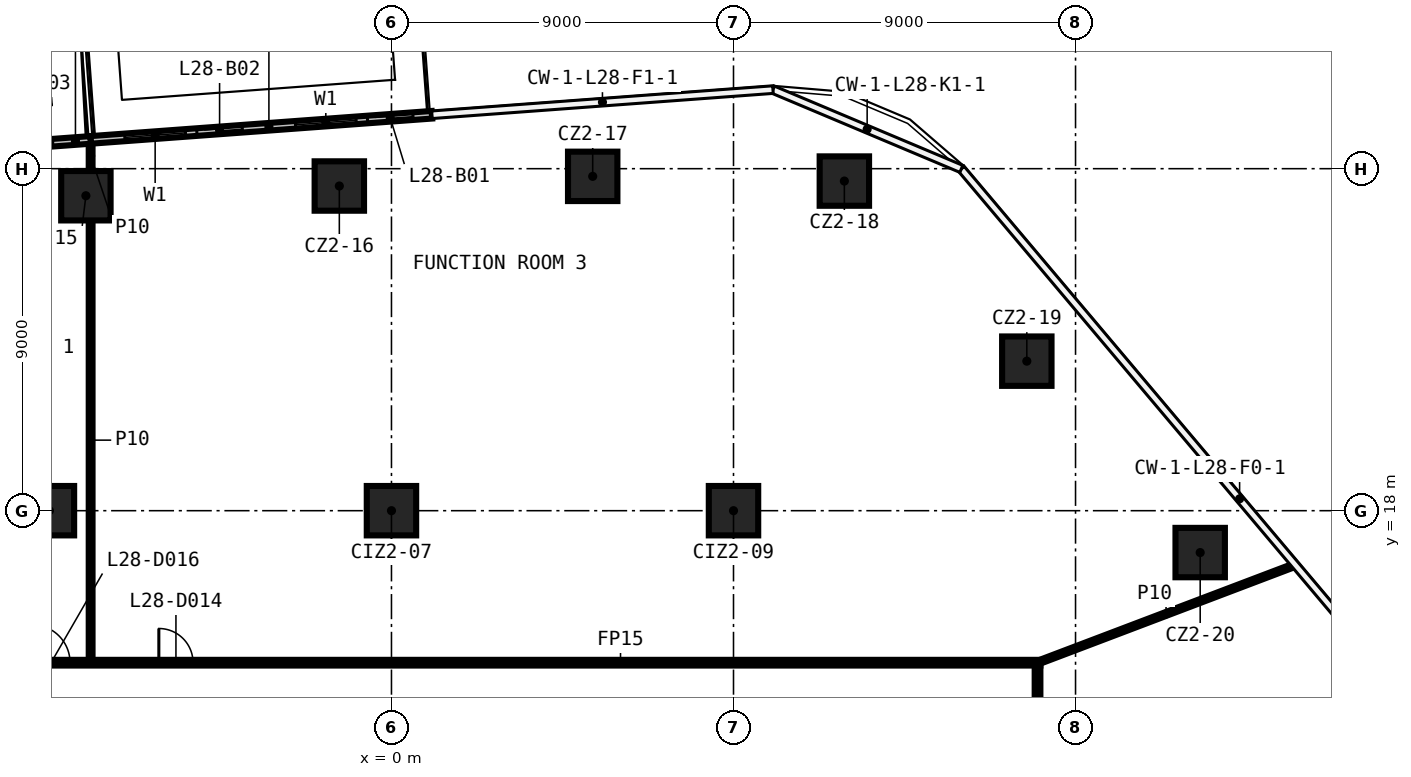
"""IFC4 building model, lengths in metres.
Left out: names, types, materials, properties, quantities, classifications, styles, units other than length and angle.
Written with IfcOpenShell. Run it as: python <this file> out.ifc"""

import sys

from ifc_helpers import new_model, si_unit, direction, frame, frame_2d, origin, origin_2d, place, context, subcontext, project, spatial, rectangle, extrude, element, fill, save


model = new_model("IFC4")
c1 = context("Model", 3, precision=1e-05, world=origin(), true_north=direction((0.0, 1.0)))
c2 = subcontext(c1, "Body", "Model", "MODEL_VIEW")
j1 = project(units=[si_unit("LENGTHUNIT", "METRE"), si_unit("PLANEANGLEUNIT", "RADIAN")], contexts=[c1])
p1 = place(None, origin())
s1 = spatial("IfcSite", under=j1, at=p1, CompositionType="ELEMENT")
p2 = place(p1, origin())
s2 = spatial("IfcBuilding", under=s1, at=p2, CompositionType="ELEMENT")
p3 = place(p2, frame((0.0, 0.0, 128.5)))
s3 = spatial("IfcBuildingStorey", under=s2, at=p3, CompositionType="ELEMENT", Elevation=128.5)
for number, where, z_axis, x_axis in (
    (1, (-8.041, 26.288, 0.0), (0.0, 0.0, 1.0), (1.0, 0.0, 0.0)),
    (2, (-1.372, 26.544, 0.0), (0.0, 0.0, 1.0), (1.0, 0.0, 0.0)),
    (3, (5.295, 26.798, 0.0), (0.0, 0.0, 1.0), (1.0, 0.0, 0.0)),
    (4, (11.917, 26.674, 0.0), (0.0, 0.0, 1.0), (1.0, 0.0, 0.0)),
    (5, (16.718, 21.935, 0.0), (0.0, 0.0, 1.0), (1.0, 0.0, 0.0)),
    (6, (21.28, 16.898, 0.0), (0.0, 0.0, 1.0), (1.0, 0.0, 0.0)),
    (7, (-9.0, 18.0, 0.0), (0.0, 0.0, 1.0), (1.0, 0.0, 0.0)),
    (8, (0.0, 18.0, 0.0), (0.0, 0.0, 1.0), (1.0, 0.0, 0.0)),
    (9, (9.0, 18.0, 0.0), (0.0, 0.0, 1.0), (1.0, 0.0, 0.0)),
):
    element("IfcColumn", number, at=place(p3, frame(where, z_axis=z_axis, x_axis=x_axis)), inside=s3, PredefinedType="COLUMN", context=c2, shape_type="SweptSolid", body=[
        extrude(rectangle(XDim=1.3, YDim=1.3, at=origin_2d()), origin(), (0.0, 0.0, 1.0), 3.3),
    ])
p4 = place(p3, frame((-17.075, 14.0, 0.0), z_axis=(0.0, 0.0, 1.0), x_axis=(1.0, 0.0, 0.0)))
e10 = element("IfcWall", 10, at=p4, inside=s3, PredefinedType="PARTITIONING", context=c2, shape_type="SweptSolid", body=[
    extrude(rectangle(XDim=34.15, YDim=0.15, at=frame_2d((17.075, 0.0))), origin(), (0.0, 0.0, 1.0), 3.3),
])
p5 = place(p4, frame((10.954, 0.0, 0.0)))
e11 = element("IfcOpeningElement", 11, at=p5, cuts=e10, PredefinedType="OPENING", context=c2, shape_type="SweptSolid", body=[
    extrude(rectangle(XDim=0.9, YDim=2.1, at=frame_2d((0.45, 1.05))), frame((0.0, 0.085, 0.0), z_axis=(0.0, -1.0, 0.0), x_axis=(1.0, 0.0, 0.0)), (0.0, 0.0, 1.0), 0.17),
])
p6 = place(p4, frame((7.617, 0.0, 0.0)))
e12 = element("IfcOpeningElement", 12, at=p6, cuts=e10, PredefinedType="OPENING", context=c2, shape_type="SweptSolid", body=[
    extrude(rectangle(XDim=1.0, YDim=2.1, at=frame_2d((0.5, 1.05))), frame((0.0, 0.085, 0.0), z_axis=(0.0, -1.0, 0.0), x_axis=(1.0, 0.0, 0.0)), (0.0, 0.0, 1.0), 0.17),
])
p7 = place(p4, frame((2.425, 0.0, 0.0)))
e13 = element("IfcOpeningElement", 13, at=p7, cuts=e10, PredefinedType="OPENING", context=c2, shape_type="SweptSolid", body=[
    extrude(rectangle(XDim=0.9, YDim=2.1, at=frame_2d((0.45, 1.05))), frame((0.0, 0.085, 0.0), z_axis=(0.0, -1.0, 0.0), x_axis=(1.0, 0.0, 0.0)), (0.0, 0.0, 1.0), 0.17),
])
p8 = place(p3, frame((17.0, 14.0, 0.0), z_axis=(0.0, 0.0, 1.0), x_axis=(0.934953139897, 0.354771230791, 0.0)))
e14 = element("IfcWall", 14, at=p8, inside=s3, PredefinedType="PARTITIONING", context=c2, shape_type="SweptSolid", body=[
    extrude(rectangle(XDim=7.234, YDim=0.1, at=frame_2d((3.617, 0.0))), origin(), (0.0, 0.0, 1.0), 3.3),
])
p9 = place(p3, frame((17.0, 13.925, 0.0), z_axis=(0.0, 0.0, 1.0), x_axis=(0.0, -1.0, 0.0)))
e15 = element("IfcWall", 15, at=p9, inside=s3, PredefinedType="PARTITIONING", context=c2, shape_type="SweptSolid", body=[
    extrude(rectangle(XDim=27.85, YDim=0.15, at=frame_2d((13.925, 0.0))), origin(), (0.0, 0.0, 1.0), 3.3),
])
p10 = place(p9, frame((24.983, 0.0, 0.0)))
e16 = element("IfcOpeningElement", 16, at=p10, cuts=e15, PredefinedType="OPENING", context=c2, shape_type="SweptSolid", body=[
    extrude(rectangle(XDim=0.9, YDim=2.1, at=frame_2d((0.45, 1.05))), frame((0.0, 0.085, 0.0), z_axis=(0.0, -1.0, 0.0), x_axis=(1.0, 0.0, 0.0)), (0.0, 0.0, 1.0), 0.17),
])
p11 = place(p9, frame((20.143, 0.0, 0.0)))
e17 = element("IfcOpeningElement", 17, at=p11, cuts=e15, PredefinedType="OPENING", context=c2, shape_type="SweptSolid", body=[
    extrude(rectangle(XDim=0.9, YDim=2.1, at=frame_2d((0.45, 1.05))), frame((0.0, 0.085, 0.0), z_axis=(0.0, -1.0, 0.0), x_axis=(1.0, 0.0, 0.0)), (0.0, 0.0, 1.0), 0.17),
])
p12 = place(p9, frame((11.054, 0.0, 0.0)))
e18 = element("IfcOpeningElement", 18, at=p12, cuts=e15, PredefinedType="OPENING", context=c2, shape_type="SweptSolid", body=[
    extrude(rectangle(XDim=1.0, YDim=2.1, at=frame_2d((0.5, 1.05))), frame((0.0, 0.085, 0.0), z_axis=(0.0, -1.0, 0.0), x_axis=(1.0, 0.0, 0.0)), (0.0, 0.0, 1.0), 0.17),
])
p13 = place(p9, frame((7.139, 0.0, 0.0)))
e19 = element("IfcOpeningElement", 19, at=p13, cuts=e15, PredefinedType="OPENING", context=c2, shape_type="SweptSolid", body=[
    extrude(rectangle(XDim=0.9, YDim=2.1, at=frame_2d((0.45, 1.05))), frame((0.0, 0.085, 0.0), z_axis=(0.0, -1.0, 0.0), x_axis=(1.0, 0.0, 0.0)), (0.0, 0.0, 1.0), 0.17),
])
p14 = place(p3, frame((-7.916, 14.075, 0.0), z_axis=(0.0, 0.0, 1.0), x_axis=(0.0, 1.0, 0.0)))
e20 = element("IfcWall", 20, at=p14, inside=s3, PredefinedType="PARTITIONING", context=c2, shape_type="SweptSolid", body=[
    extrude(rectangle(XDim=11.563, YDim=0.1, at=frame_2d((5.781, 0.0))), origin(), (0.0, 0.0, 1.0), 3.3),
])
p15 = place(p3, frame((-7.916, 26.938, 0.0), z_axis=(0.0, 0.0, 1.0), x_axis=(0.0, 1.0, 0.0)))
e21 = element("IfcWall", 21, at=p15, inside=s3, PredefinedType="PARTITIONING", context=c2, shape_type="SweptSolid", body=[
    extrude(rectangle(XDim=0.799, YDim=0.1, at=frame_2d((0.399, 0.0))), origin(), (0.0, 0.0, 1.0), 3.3),
])
p16 = place(p3, frame((1.065, 28.419, 0.0), z_axis=(0.0, 0.0, 1.0), x_axis=(-0.997293582655, -0.07352217349, 0.0)))
e22 = element("IfcWall", 22, at=p16, inside=s3, PredefinedType="SOLIDWALL", context=c2, shape_type="SweptSolid", body=[
    extrude(rectangle(XDim=9.006, YDim=0.2, at=frame_2d((4.503, 0.0))), origin(), (0.0, 0.0, 1.0), 3.3),
])
p17 = place(p16, frame((2.0, 0.0, 0.6)))
e23 = element("IfcOpeningElement", 23, at=p17, cuts=e22, PredefinedType="OPENING", context=c2, shape_type="SweptSolid", body=[
    extrude(rectangle(XDim=1.6, YDim=2.4, at=frame_2d((0.8, 1.2))), frame((0.0, 0.11, 0.0), z_axis=(0.0, -1.0, 0.0), x_axis=(1.0, 0.0, 0.0)), (0.0, 0.0, 1.0), 0.22),
])
p18 = place(p16, frame((0.5, 0.0, 0.0)))
e24 = element("IfcOpeningElement", 24, at=p18, cuts=e22, PredefinedType="OPENING", context=c2, shape_type="SweptSolid", body=[
    extrude(rectangle(XDim=1.2, YDim=2.4, at=frame_2d((0.6, 1.2))), frame((0.0, 0.11, 0.0), z_axis=(0.0, -1.0, 0.0), x_axis=(1.0, 0.0, 0.0)), (0.0, 0.0, 1.0), 0.22),
])
p19 = place(p16, frame((6.503, 0.0, 0.6)))
e25 = element("IfcOpeningElement", 25, at=p19, cuts=e22, PredefinedType="OPENING", context=c2, shape_type="SweptSolid", body=[
    extrude(rectangle(XDim=1.6, YDim=2.4, at=frame_2d((0.8, 1.2))), frame((0.0, 0.11, 0.0), z_axis=(0.0, -1.0, 0.0), x_axis=(1.0, 0.0, 0.0)), (0.0, 0.0, 1.0), 0.22),
])
p20 = place(p16, frame((5.003, 0.0, 0.0)))
e26 = element("IfcOpeningElement", 26, at=p20, cuts=e22, PredefinedType="OPENING", context=c2, shape_type="SweptSolid", body=[
    extrude(rectangle(XDim=1.2, YDim=2.4, at=frame_2d((0.6, 1.2))), frame((0.0, 0.11, 0.0), z_axis=(0.0, -1.0, 0.0), x_axis=(1.0, 0.0, 0.0)), (0.0, 0.0, 1.0), 0.22),
])
p21 = place(p3, frame((-7.917, 27.757, 0.0), z_axis=(0.0, 0.0, 1.0), x_axis=(-0.997291417846, -0.073551532206, 0.0)))
e27 = element("IfcWall", 27, at=p21, inside=s3, PredefinedType="SOLIDWALL", context=c2, shape_type="SweptSolid", body=[
    extrude(rectangle(XDim=4.494, YDim=0.2, at=frame_2d((2.247, 0.0))), origin(), (0.0, 0.0, 1.0), 3.3),
])
p22 = place(p21, frame((2.5, 0.0, 0.6)))
e28 = element("IfcOpeningElement", 28, at=p22, cuts=e27, PredefinedType="OPENING", context=c2, shape_type="SweptSolid", body=[
    extrude(rectangle(XDim=1.6, YDim=2.4, at=frame_2d((0.8, 1.2))), frame((0.0, 0.11, 0.0), z_axis=(0.0, -1.0, 0.0), x_axis=(1.0, 0.0, 0.0)), (0.0, 0.0, 1.0), 0.22),
])
p23 = place(p21, frame((1.0, 0.0, 0.0)))
e29 = element("IfcOpeningElement", 29, at=p23, cuts=e27, PredefinedType="OPENING", context=c2, shape_type="SweptSolid", body=[
    extrude(rectangle(XDim=1.2, YDim=2.4, at=frame_2d((0.6, 1.2))), frame((0.0, 0.11, 0.0), z_axis=(0.0, -1.0, 0.0), x_axis=(1.0, 0.0, 0.0)), (0.0, 0.0, 1.0), 0.22),
])
p24 = place(p5, origin())
e30 = element("IfcDoor", 30, at=p24, inside=s3, OperationType="SINGLE_SWING_RIGHT", PredefinedType="DOOR", context=c2, shape_type="SweptSolid", body=[
    extrude(rectangle(XDim=0.9, YDim=2.1, at=frame_2d((0.45, 1.05))), frame((0.0, 0.025, 0.0), z_axis=(0.0, -1.0, 0.0), x_axis=(1.0, 0.0, 0.0)), (0.0, 0.0, 1.0), 0.05),
])
fill(e11, e30)
p25 = place(p6, origin())
e31 = element("IfcDoor", 31, at=p25, inside=s3, OperationType="SINGLE_SWING_LEFT", PredefinedType="DOOR", context=c2, shape_type="SweptSolid", body=[
    extrude(rectangle(XDim=1.0, YDim=2.1, at=frame_2d((0.5, 1.05))), frame((0.0, 0.025, 0.0), z_axis=(0.0, -1.0, 0.0), x_axis=(1.0, 0.0, 0.0)), (0.0, 0.0, 1.0), 0.05),
])
fill(e12, e31)
p26 = place(p17, origin())
e32 = element("IfcWindow", 32, at=p26, inside=s3, PartitioningType="SINGLE_PANEL", PredefinedType="WINDOW", context=c2, shape_type="SweptSolid", body=[
    extrude(rectangle(XDim=1.6, YDim=2.4, at=frame_2d((0.8, 1.2))), frame((0.0, 0.03, 0.0), z_axis=(0.0, -1.0, 0.0), x_axis=(1.0, 0.0, 0.0)), (0.0, 0.0, 1.0), 0.06),
])
fill(e23, e32)
p27 = place(p18, origin())
e33 = element("IfcDoor", 33, at=p27, inside=s3, OperationType="SLIDING_TO_LEFT", PredefinedType="DOOR", context=c2, shape_type="SweptSolid", body=[
    extrude(rectangle(XDim=1.2, YDim=2.4, at=frame_2d((0.6, 1.2))), frame((0.0, 0.025, 0.0), z_axis=(0.0, -1.0, 0.0), x_axis=(1.0, 0.0, 0.0)), (0.0, 0.0, 1.0), 0.05),
])
fill(e24, e33)
p28 = place(p19, origin())
e34 = element("IfcWindow", 34, at=p28, inside=s3, PartitioningType="SINGLE_PANEL", PredefinedType="WINDOW", context=c2, shape_type="SweptSolid", body=[
    extrude(rectangle(XDim=1.6, YDim=2.4, at=frame_2d((0.8, 1.2))), frame((0.0, 0.03, 0.0), z_axis=(0.0, -1.0, 0.0), x_axis=(1.0, 0.0, 0.0)), (0.0, 0.0, 1.0), 0.06),
])
fill(e25, e34)
p29 = place(p20, origin())
e35 = element("IfcDoor", 35, at=p29, inside=s3, OperationType="SLIDING_TO_LEFT", PredefinedType="DOOR", context=c2, shape_type="SweptSolid", body=[
    extrude(rectangle(XDim=1.2, YDim=2.4, at=frame_2d((0.6, 1.2))), frame((0.0, 0.025, 0.0), z_axis=(0.0, -1.0, 0.0), x_axis=(1.0, 0.0, 0.0)), (0.0, 0.0, 1.0), 0.05),
])
fill(e26, e35)
p30 = place(p23, origin())
e36 = element("IfcDoor", 36, at=p30, inside=s3, OperationType="SLIDING_TO_LEFT", PredefinedType="DOOR", context=c2, shape_type="SweptSolid", body=[
    extrude(rectangle(XDim=1.2, YDim=2.4, at=frame_2d((0.6, 1.2))), frame((0.0, 0.025, 0.0), z_axis=(0.0, -1.0, 0.0), x_axis=(1.0, 0.0, 0.0)), (0.0, 0.0, 1.0), 0.05),
])
fill(e29, e36)
save(model, sys.argv[1])
